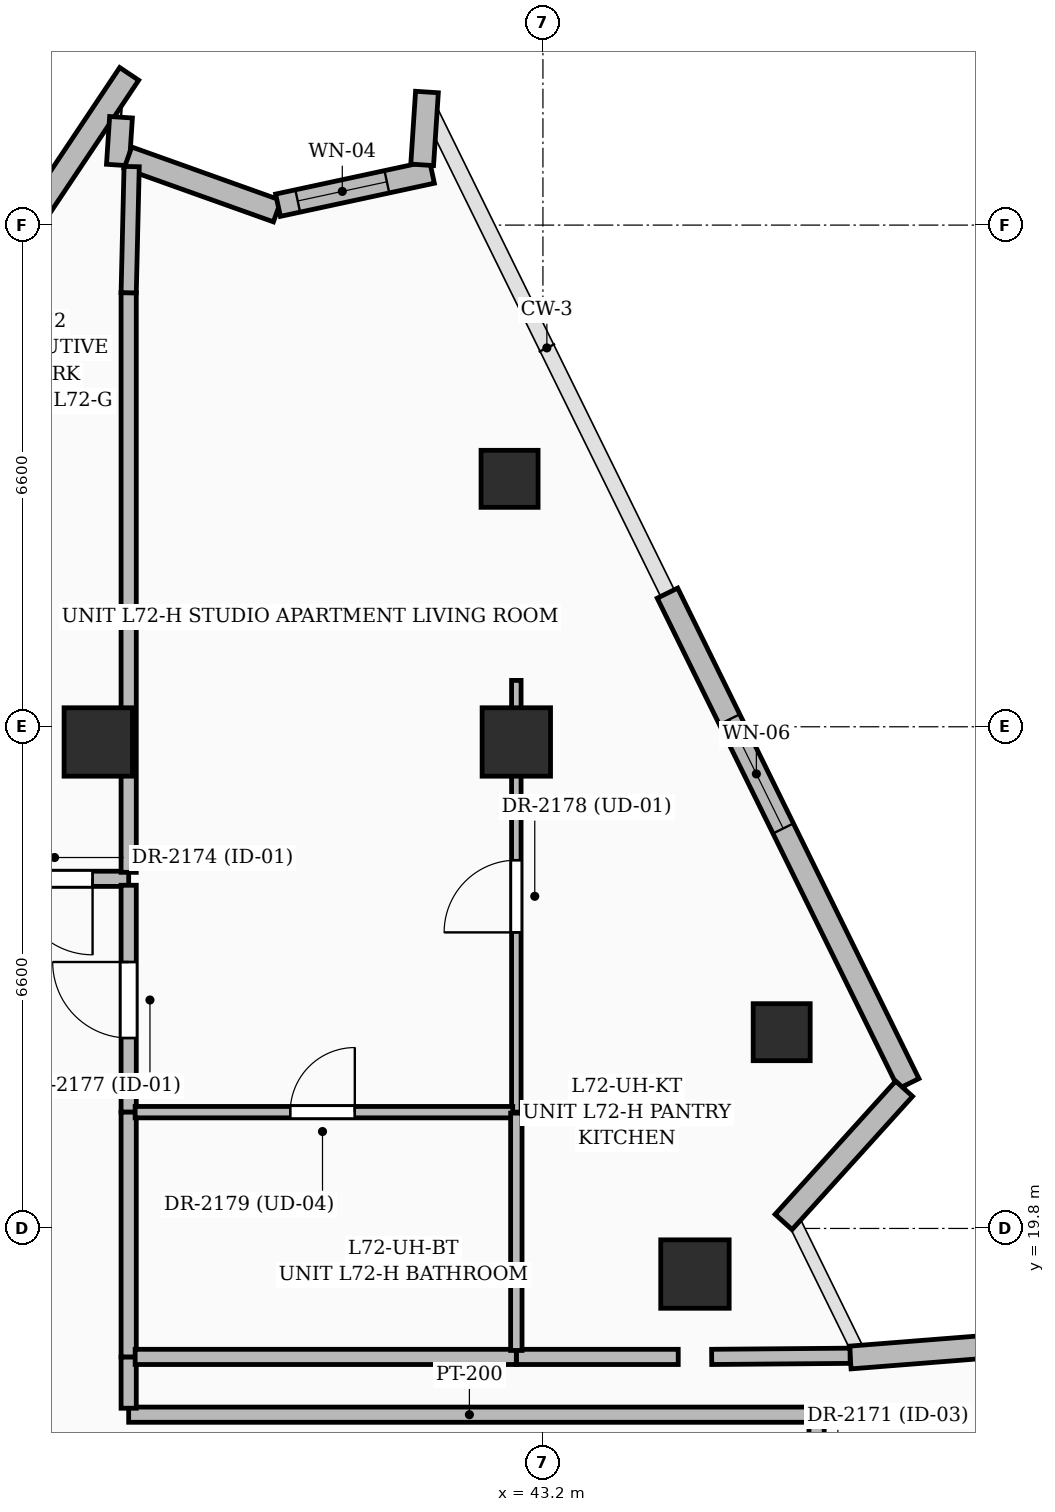
"""IFC4 building model, lengths in metres.
Left out: names, types, materials, properties, quantities, classifications, styles, units other than length and angle.
Written with IfcOpenShell. Run it as: python <this file> out.ifc"""

import sys

from ifc_helpers import new_model, si_unit, direction, frame, frame_2d, origin, origin_2d, place, context, subcontext, project, spatial, rectangle, extrude, element, fill, save


model = new_model("IFC4")
c1 = context("Model", 3, precision=1e-05, world=origin(), true_north=direction((0.0, 1.0)))
c2 = subcontext(c1, "Body", "Model", "MODEL_VIEW")
j1 = project(units=[si_unit("LENGTHUNIT", "METRE"), si_unit("PLANEANGLEUNIT", "RADIAN")], contexts=[c1])
p1 = place(None, origin())
s1 = spatial("IfcSite", under=j1, at=p1, CompositionType="ELEMENT")
p2 = place(p1, origin())
s2 = spatial("IfcBuilding", under=s1, at=p2, CompositionType="ELEMENT")
p3 = place(p2, frame((0.0, 0.0, 278.25)))
s3 = spatial("IfcBuildingStorey", under=s2, at=p3, CompositionType="ELEMENT", Elevation=278.25)
for number, where, z_axis, x_axis in (
    (1, (45.2, 19.2, 0.0), (0.0, 0.0, 1.0), (1.0, 0.0, 0.0)),
    (2, (42.85, 26.2, 0.0), (0.0, 0.0, 1.0), (1.0, 0.0, 0.0)),
    (3, (37.35, 26.2, 0.0), (0.0, 0.0, 1.0), (1.0, 0.0, 0.0)),
):
    element("IfcColumn", number, at=place(p3, frame(where, z_axis=z_axis, x_axis=x_axis)), inside=s3, PredefinedType="COLUMN", context=c2, shape_type="SweptSolid", body=[
        extrude(rectangle(XDim=0.9, YDim=0.9, at=origin_2d()), origin(), (0.0, 0.0, 1.0), 3.75),
    ])
for number, where, z_axis, x_axis in (
    (4, (46.341, 22.382, 0.0), (0.0, 0.0, 1.0), (1.0, 0.0, 0.0)),
    (5, (42.761, 29.662, 0.0), (0.0, 0.0, 1.0), (1.0, 0.0, 0.0)),
):
    element("IfcColumn", number, at=place(p3, frame(where, z_axis=z_axis, x_axis=x_axis)), inside=s3, PredefinedType="COLUMN", context=c2, shape_type="SweptSolid", body=[
        extrude(rectangle(XDim=0.75, YDim=0.75, at=origin_2d()), origin(), (0.0, 0.0, 1.0), 3.75),
    ])
p4 = place(p3, frame((33.242, 28.227, 0.0), z_axis=(0.0, 0.0, 1.0), x_axis=(0.555212816766, 0.831708319123, 0.0)))
e6 = element("IfcWall", 6, at=p4, inside=s3, PredefinedType="SOLIDWALL", context=c2, shape_type="SweptSolid", body=[
    extrude(rectangle(XDim=8.131, YDim=0.3, at=frame_2d((4.066, 0.0))), origin(), (0.0, 0.0, 1.0), 3.5),
])
p5 = place(p4, frame((1.025, 0.0, 0.6)))
e7 = element("IfcOpeningElement", 7, at=p5, cuts=e6, PredefinedType="OPENING", context=c2, shape_type="SweptSolid", body=[
    extrude(rectangle(XDim=1.5, YDim=2.1, at=frame_2d((0.75, 1.05))), frame((0.0, 0.16, 0.0), z_axis=(0.0, -1.0, 0.0), x_axis=(1.0, 0.0, 0.0)), (0.0, 0.0, 1.0), 0.32),
])
p6 = place(p3, frame((37.649, 34.419, 0.0), z_axis=(0.0, 0.0, 1.0), x_axis=(-0.065490172125, -0.997853214333, 0.0)))
e8 = element("IfcWall", 8, at=p6, inside=s3, PredefinedType="SOLIDWALL", context=c2, shape_type="SweptSolid", body=[
    extrude(rectangle(XDim=0.63, YDim=0.3, at=frame_2d((0.315, 0.0))), origin(), (0.0, 0.0, 1.0), 3.5),
])
p7 = place(p3, frame((37.74, 33.886, 0.0), z_axis=(0.0, 0.0, 1.0), x_axis=(0.941667785429, -0.336543878097, 0.0)))
e9 = element("IfcWall", 9, at=p7, inside=s3, PredefinedType="SOLIDWALL", context=c2, shape_type="SweptSolid", body=[
    extrude(rectangle(XDim=2.087, YDim=0.3, at=frame_2d((1.043, 0.0))), origin(), (0.0, 0.0, 1.0), 3.5),
])
p8 = place(p3, frame((39.715, 33.261, 0.0), z_axis=(0.0, 0.0, 1.0), x_axis=(0.977601927603, 0.210462517201, 0.0)))
e10 = element("IfcWall", 10, at=p8, inside=s3, PredefinedType="SOLIDWALL", context=c2, shape_type="SweptSolid", body=[
    extrude(rectangle(XDim=2.072, YDim=0.3, at=frame_2d((1.036, 0.0))), origin(), (0.0, 0.0, 1.0), 3.5),
])
p9 = place(p8, frame((0.265, 0.0, 0.8)))
e11 = element("IfcOpeningElement", 11, at=p9, cuts=e10, PredefinedType="OPENING", context=c2, shape_type="SweptSolid", body=[
    extrude(rectangle(XDim=1.2, YDim=1.8, at=frame_2d((0.6, 0.9))), frame((0.0, 0.16, 0.0), z_axis=(0.0, -1.0, 0.0), x_axis=(1.0, 0.0, 0.0)), (0.0, 0.0, 1.0), 0.32),
])
p10 = place(p3, frame((41.611, 33.793, 0.0), z_axis=(0.0, 0.0, 1.0), x_axis=(0.065860770899, 0.997828822422, 0.0)))
e12 = element("IfcWall", 12, at=p10, inside=s3, PredefinedType="SOLIDWALL", context=c2, shape_type="SweptSolid", body=[
    extrude(rectangle(XDim=0.96, YDim=0.3, at=frame_2d((0.48, 0.0))), origin(), (0.0, 0.0, 1.0), 3.5),
])
p11 = place(p3, frame((44.838, 28.158, 0.0), z_axis=(0.0, 0.0, 1.0), x_axis=(0.44132368898, -0.897347982416, 0.0)))
e13 = element("IfcWall", 13, at=p11, inside=s3, PredefinedType="SOLIDWALL", context=c2, shape_type="SweptSolid", body=[
    extrude(rectangle(XDim=7.191, YDim=0.3, at=frame_2d((3.596, 0.0))), origin(), (0.0, 0.0, 1.0), 3.5),
])
p12 = place(p11, frame((1.85, 0.0, 0.55)))
e14 = element("IfcOpeningElement", 14, at=p12, cuts=e13, PredefinedType="OPENING", context=c2, shape_type="SweptSolid", body=[
    extrude(rectangle(XDim=1.6, YDim=2.2, at=frame_2d((0.8, 1.1))), frame((0.0, 0.16, 0.0), z_axis=(0.0, -1.0, 0.0), x_axis=(1.0, 0.0, 0.0)), (0.0, 0.0, 1.0), 0.32),
])
p13 = place(p3, frame((47.952, 21.638, 0.0), z_axis=(0.0, 0.0, 1.0), x_axis=(-0.670788898496, -0.741648335571, 0.0)))
e15 = element("IfcWall", 15, at=p13, inside=s3, PredefinedType="SOLIDWALL", context=c2, shape_type="SweptSolid", body=[
    extrude(rectangle(XDim=2.364, YDim=0.3, at=frame_2d((1.182, 0.0))), origin(), (0.0, 0.0, 1.0), 2.696),
])
p14 = place(p3, frame((47.242, 18.102, 0.0), z_axis=(0.0, 0.0, 1.0), x_axis=(0.996905336601, 0.078611385028, 0.0)))
e16 = element("IfcWall", 16, at=p14, inside=s3, PredefinedType="SOLIDWALL", context=c2, shape_type="SweptSolid", body=[
    extrude(rectangle(XDim=2.593, YDim=0.3, at=frame_2d((1.297, 0.0))), origin(), (0.0, 0.0, 1.0), 2.696),
])
p15 = place(p3, frame((46.8, 15.05, 0.0), z_axis=(0.0, 0.0, 1.0), x_axis=(0.0, 1.0, 0.0)))
e17 = element("IfcWall", 17, at=p15, inside=s3, PredefinedType="PARTITIONING", context=c2, shape_type="SweptSolid", body=[
    extrude(rectangle(XDim=2.3, YDim=0.2, at=frame_2d((1.15, 0.0))), origin(), (0.0, 0.0, 1.0), 2.685),
])
p16 = place(p15, frame((0.7, 0.0, 0.0)))
e18 = element("IfcOpeningElement", 18, at=p16, cuts=e17, PredefinedType="OPENING", context=c2, shape_type="SweptSolid", body=[
    extrude(rectangle(XDim=0.9, YDim=2.1, at=frame_2d((0.45, 1.05))), frame((0.0, 0.11, 0.0), z_axis=(0.0, -1.0, 0.0), x_axis=(1.0, 0.0, 0.0)), (0.0, 0.0, 1.0), 0.22),
])
p17 = place(p3, frame((46.715, 17.35, 0.0), z_axis=(0.0, 0.0, 1.0), x_axis=(-1.0, 0.0, 0.0)))
e19 = element("IfcWall", 19, at=p17, inside=s3, PredefinedType="PARTITIONING", context=c2, shape_type="SweptSolid", body=[
    extrude(rectangle(XDim=8.965, YDim=0.2, at=frame_2d((4.482, 0.0))), origin(), (0.0, 0.0, 1.0), 2.685),
])
p18 = place(p3, frame((37.75, 17.435, 0.0), z_axis=(0.0, 0.0, 1.0), x_axis=(0.0, 1.0, 0.0)))
e20 = element("IfcWall", 20, at=p18, inside=s3, PredefinedType="PARTITIONING", context=c2, shape_type="SweptSolid", body=[
    extrude(rectangle(XDim=0.675, YDim=0.2, at=frame_2d((0.337, 0.0))), origin(), (0.0, 0.0, 1.0), 3.5),
])
p19 = place(p3, frame((37.75, 24.4, 0.0), z_axis=(0.0, 0.0, 1.0), x_axis=(-1.0, 0.0, 0.0)))
e21 = element("IfcWall", 21, at=p19, inside=s3, PredefinedType="PARTITIONING", context=c2, shape_type="SweptSolid", body=[
    extrude(rectangle(XDim=1.95, YDim=0.2, at=frame_2d((0.975, 0.0))), origin(), (0.0, 0.0, 1.0), 2.685),
])
p20 = place(p19, frame((0.475, 0.0, 0.0)))
e22 = element("IfcOpeningElement", 22, at=p20, cuts=e21, PredefinedType="OPENING", context=c2, shape_type="SweptSolid", body=[
    extrude(rectangle(XDim=1.0, YDim=2.2, at=frame_2d((0.5, 1.1))), frame((0.0, 0.11, 0.0), z_axis=(0.0, -1.0, 0.0), x_axis=(1.0, 0.0, 0.0)), (0.0, 0.0, 1.0), 0.22),
])
p21 = place(p3, frame((37.75, 21.33, 0.0), z_axis=(0.0, 0.0, 1.0), x_axis=(0.0, 1.0, 0.0)))
e23 = element("IfcWall", 23, at=p21, inside=s3, PredefinedType="PARTITIONING", context=c2, shape_type="SweptSolid", body=[
    extrude(rectangle(XDim=2.985, YDim=0.2, at=frame_2d((1.492, 0.0))), origin(), (0.0, 0.0, 1.0), 3.5),
])
p22 = place(p21, frame((0.975, 0.0, 0.0)))
e24 = element("IfcOpeningElement", 24, at=p22, cuts=e23, PredefinedType="OPENING", context=c2, shape_type="SweptSolid", body=[
    extrude(rectangle(XDim=1.0, YDim=2.2, at=frame_2d((0.5, 1.1))), frame((0.0, 0.11, 0.0), z_axis=(0.0, -1.0, 0.0), x_axis=(1.0, 0.0, 0.0)), (0.0, 0.0, 1.0), 0.22),
])
p23 = place(p3, frame((37.75, 18.11, 0.0), z_axis=(0.0, 0.0, 1.0), x_axis=(0.0, 1.0, 0.0)))
e25 = element("IfcWall", 25, at=p23, inside=s3, PredefinedType="PARTITIONING", context=c2, shape_type="SweptSolid", body=[
    extrude(rectangle(XDim=3.22, YDim=0.2, at=frame_2d((1.61, 0.0))), origin(), (0.0, 0.0, 1.0), 3.5),
])
p24 = place(p3, frame((44.98, 18.11, 0.0), z_axis=(0.0, 0.0, 1.0), x_axis=(-1.0, 0.0, 0.0)))
e26 = element("IfcWall", 26, at=p24, inside=s3, PredefinedType="PARTITIONING", context=c2, shape_type="SweptSolid", body=[
    extrude(rectangle(XDim=2.13, YDim=0.2, at=frame_2d((1.065, 0.0))), origin(), (0.0, 0.0, 1.0), 3.5),
])
p25 = place(p3, frame((47.241, 18.125, 0.0), z_axis=(0.0, 0.0, 1.0), x_axis=(-0.999966561509, -0.00817776649, 0.0)))
e27 = element("IfcWall", 27, at=p25, inside=s3, PredefinedType="PARTITIONING", context=c2, shape_type="SweptSolid", body=[
    extrude(rectangle(XDim=1.821, YDim=0.2, at=frame_2d((0.911, 0.0))), origin(), (0.0, 0.0, 1.0), 2.685),
])
p26 = place(p3, frame((42.85, 18.11, 0.0), z_axis=(0.0, 0.0, 1.0), x_axis=(-1.0, 0.0, 0.0)))
e28 = element("IfcWall", 28, at=p26, inside=s3, PredefinedType="PARTITIONING", context=c2, shape_type="SweptSolid", body=[
    extrude(rectangle(XDim=5.015, YDim=0.2, at=frame_2d((2.508, 0.0))), origin(), (0.0, 0.0, 1.0), 3.5),
])
p27 = place(p3, frame((37.75, 24.485, 0.0), z_axis=(0.0, 0.0, 1.0), x_axis=(0.0, 1.0, 0.0)))
e29 = element("IfcWall", 29, at=p27, inside=s3, PredefinedType="PARTITIONING", context=c2, shape_type="SweptSolid", body=[
    extrude(rectangle(XDim=7.625, YDim=0.2, at=frame_2d((3.812, 0.0))), origin(), (0.0, 0.0, 1.0), 2.685),
])
p28 = place(p3, frame((37.75, 32.11, 0.0), z_axis=(0.0, 0.0, 1.0), x_axis=(0.02352635898, 0.999723216912, 0.0)))
e30 = element("IfcWall", 30, at=p28, inside=s3, PredefinedType="PARTITIONING", context=c2, shape_type="SweptSolid", body=[
    extrude(rectangle(XDim=1.66, YDim=0.2, at=frame_2d((0.83, 0.0))), origin(), (0.0, 0.0, 1.0), 3.5),
])
p29 = place(p3, frame((42.85, 21.33, 0.0), z_axis=(0.0, 0.0, 1.0), x_axis=(0.0, 1.0, 0.0)))
e31 = element("IfcWall", 31, at=p29, inside=s3, PredefinedType="PARTITIONING", context=c2, shape_type="SweptSolid", body=[
    extrude(rectangle(XDim=5.68, YDim=0.125, at=frame_2d((2.84, 0.0))), origin(), (0.0, 0.0, 1.0), 2.685),
])
p30 = place(p29, frame((2.365, 0.0, 0.0)))
e32 = element("IfcOpeningElement", 32, at=p30, cuts=e31, PredefinedType="OPENING", context=c2, shape_type="SweptSolid", body=[
    extrude(rectangle(XDim=0.95, YDim=2.2, at=frame_2d((0.475, 1.1))), frame((0.0, 0.072, 0.0), z_axis=(0.0, -1.0, 0.0), x_axis=(1.0, 0.0, 0.0)), (0.0, 0.0, 1.0), 0.145),
])
p31 = place(p3, frame((37.835, 21.33, 0.0), z_axis=(0.0, 0.0, 1.0), x_axis=(1.0, 0.0, 0.0)))
e33 = element("IfcWall", 33, at=p31, inside=s3, PredefinedType="PARTITIONING", context=c2, shape_type="SweptSolid", body=[
    extrude(rectangle(XDim=4.968, YDim=0.15, at=frame_2d((2.484, 0.0))), origin(), (0.0, 0.0, 1.0), 3.5),
])
p32 = place(p31, frame((2.04, 0.0, 0.0)))
e34 = element("IfcOpeningElement", 34, at=p32, cuts=e33, PredefinedType="OPENING", context=c2, shape_type="SweptSolid", body=[
    extrude(rectangle(XDim=0.85, YDim=2.1, at=frame_2d((0.425, 1.05))), frame((0.0, 0.085, 0.0), z_axis=(0.0, -1.0, 0.0), x_axis=(1.0, 0.0, 0.0)), (0.0, 0.0, 1.0), 0.17),
])
p33 = place(p3, frame((42.85, 21.317, 0.0), z_axis=(0.0, 0.0, 1.0), x_axis=(0.0, -1.0, 0.0)))
e35 = element("IfcWall", 35, at=p33, inside=s3, PredefinedType="PARTITIONING", context=c2, shape_type="SweptSolid", body=[
    extrude(rectangle(XDim=3.122, YDim=0.15, at=frame_2d((1.561, 0.0))), origin(), (0.0, 0.0, 1.0), 3.5),
])
p34 = place(p9, origin())
e36 = element("IfcWindow", 36, at=p34, inside=s3, PartitioningType="SINGLE_PANEL", PredefinedType="WINDOW", context=c2, shape_type="SweptSolid", body=[
    extrude(rectangle(XDim=1.2, YDim=1.8, at=frame_2d((0.6, 0.9))), frame((0.0, 0.03, 0.0), z_axis=(0.0, -1.0, 0.0), x_axis=(1.0, 0.0, 0.0)), (0.0, 0.0, 1.0), 0.06),
])
fill(e11, e36)
p35 = place(p12, origin())
e37 = element("IfcWindow", 37, at=p35, inside=s3, PartitioningType="SINGLE_PANEL", PredefinedType="WINDOW", context=c2, shape_type="SweptSolid", body=[
    extrude(rectangle(XDim=1.6, YDim=2.2, at=frame_2d((0.8, 1.1))), frame((0.0, 0.03, 0.0), z_axis=(0.0, -1.0, 0.0), x_axis=(1.0, 0.0, 0.0)), (0.0, 0.0, 1.0), 0.06),
])
fill(e14, e37)
p36 = place(p20, origin())
e38 = element("IfcDoor", 38, at=p36, inside=s3, OperationType="SINGLE_SWING_LEFT", PredefinedType="DOOR", context=c2, shape_type="SweptSolid", body=[
    extrude(rectangle(XDim=1.0, YDim=2.2, at=frame_2d((0.5, 1.1))), frame((0.0, 0.025, 0.0), z_axis=(0.0, -1.0, 0.0), x_axis=(1.0, 0.0, 0.0)), (0.0, 0.0, 1.0), 0.05),
])
fill(e22, e38)
p37 = place(p22, origin())
e39 = element("IfcDoor", 39, at=p37, inside=s3, OperationType="SINGLE_SWING_RIGHT", PredefinedType="DOOR", context=c2, shape_type="SweptSolid", body=[
    extrude(rectangle(XDim=1.0, YDim=2.2, at=frame_2d((0.5, 1.1))), frame((0.0, 0.025, 0.0), z_axis=(0.0, -1.0, 0.0), x_axis=(1.0, 0.0, 0.0)), (0.0, 0.0, 1.0), 0.05),
])
fill(e24, e39)
p38 = place(p30, origin())
e40 = element("IfcDoor", 40, at=p38, inside=s3, OperationType="SINGLE_SWING_LEFT", PredefinedType="DOOR", context=c2, shape_type="SweptSolid", body=[
    extrude(rectangle(XDim=0.95, YDim=2.2, at=frame_2d((0.475, 1.1))), frame((0.0, 0.025, 0.0), z_axis=(0.0, -1.0, 0.0), x_axis=(1.0, 0.0, 0.0)), (0.0, 0.0, 1.0), 0.05),
])
fill(e32, e40)
p39 = place(p32, origin())
e41 = element("IfcDoor", 41, at=p39, inside=s3, OperationType="SINGLE_SWING_RIGHT", PredefinedType="DOOR", context=c2, shape_type="SweptSolid", body=[
    extrude(rectangle(XDim=0.85, YDim=2.1, at=frame_2d((0.425, 1.05))), frame((0.0, 0.025, 0.0), z_axis=(0.0, -1.0, 0.0), x_axis=(1.0, 0.0, 0.0)), (0.0, 0.0, 1.0), 0.05),
])
fill(e34, e41)
save(model, sys.argv[1])
